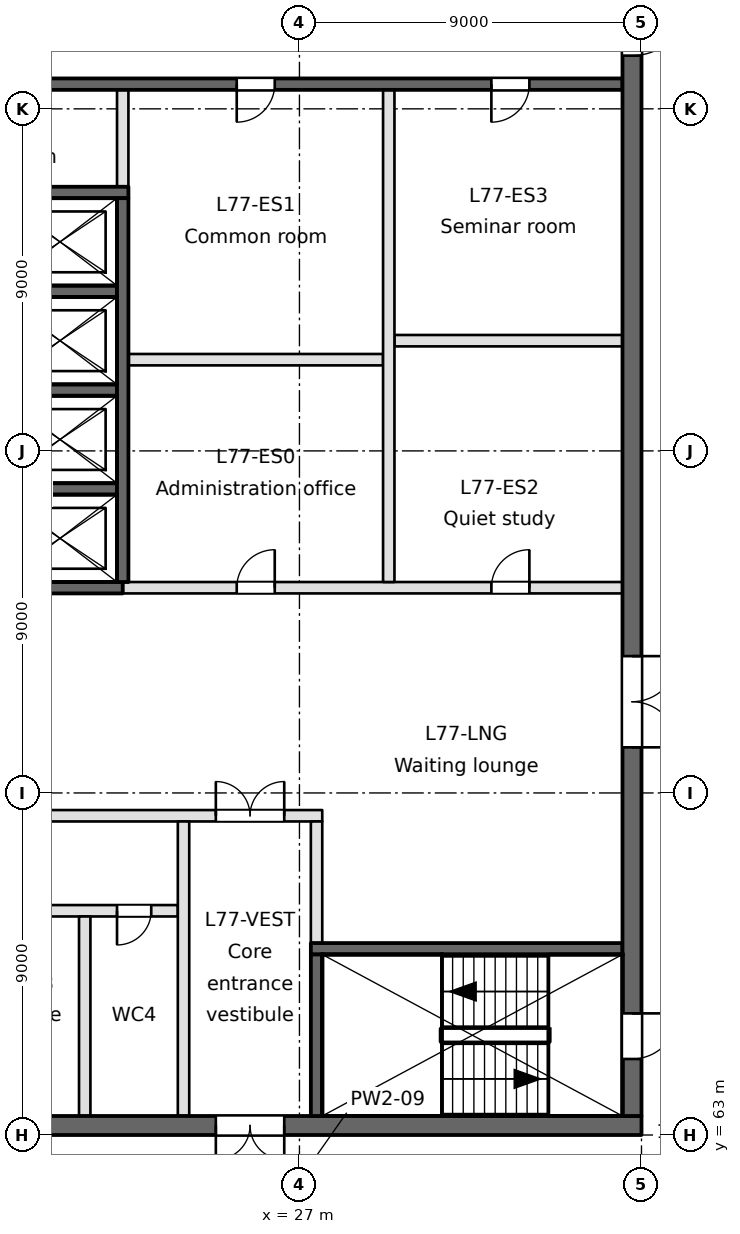
"""IFC4 building model, lengths in metres.
Left out: names, types, materials, properties, quantities, classifications, styles, units other than length and angle.
Written with IfcOpenShell. Run it as: python <this file> out.ifc"""

import sys

from ifc_helpers import new_model, si_unit, direction, frame, frame_2d, origin, place, context, subcontext, project, spatial, rectangle, extrude, element, fill, save


model = new_model("IFC4")
c1 = context("Model", 3, precision=1e-05, world=origin(), true_north=direction((0.0, 1.0)))
c2 = subcontext(c1, "Body", "Model", "MODEL_VIEW")
j1 = project(units=[si_unit("LENGTHUNIT", "METRE"), si_unit("PLANEANGLEUNIT", "RADIAN")], contexts=[c1])
p1 = place(None, origin())
s1 = spatial("IfcSite", under=j1, at=p1, CompositionType="ELEMENT")
p2 = place(p1, origin())
s2 = spatial("IfcBuilding", under=s1, at=p2, CompositionType="ELEMENT")
p3 = place(p2, frame((0.0, 0.0, 299.3)))
s3 = spatial("IfcBuildingStorey", under=s2, at=p3, CompositionType="ELEMENT", Elevation=299.3)
p4 = place(p3, frame((0.9, 63.25, -0.4), z_axis=(0.0, 0.0, 1.0), x_axis=(1.0, 0.0, 0.0)))
e1 = element("IfcWall", 1, at=p4, inside=s3, PredefinedType="SOLIDWALL", context=c2, shape_type="SweptSolid", body=[
    extrude(rectangle(XDim=35.1, YDim=0.5, at=frame_2d((17.55, 0.0))), origin(), (0.0, 0.0, 1.0), 3.65),
])
p5 = place(p4, frame((23.9, 0.0, 0.4)))
e2 = element("IfcOpeningElement", 2, at=p5, cuts=e1, PredefinedType="OPENING", context=c2, shape_type="SweptSolid", body=[
    extrude(rectangle(XDim=1.8, YDim=2.1, at=frame_2d((0.9, 1.05))), frame((0.0, 0.25, 0.0), z_axis=(0.0, -1.0, 0.0), x_axis=(1.0, 0.0, 0.0)), (0.0, 0.0, 1.0), 0.5),
])
p6 = place(p4, frame((1.55, 0.0, 0.4)))
e3 = element("IfcOpeningElement", 3, at=p6, cuts=e1, PredefinedType="OPENING", context=c2, shape_type="SweptSolid", body=[
    extrude(rectangle(XDim=1.2, YDim=2.1, at=frame_2d((0.6, 1.05))), frame((0.0, 0.25, 0.0), z_axis=(0.0, -1.0, 0.0), x_axis=(1.0, 0.0, 0.0)), (0.0, 0.0, 1.0), 0.5),
])
p7 = place(p4, frame((6.15, 0.0, 0.4)))
e4 = element("IfcOpeningElement", 4, at=p7, cuts=e1, PredefinedType="OPENING", context=c2, shape_type="SweptSolid", body=[
    extrude(rectangle(XDim=1.2, YDim=2.1, at=frame_2d((0.6, 1.05))), frame((0.0, 0.25, 0.0), z_axis=(0.0, -1.0, 0.0), x_axis=(1.0, 0.0, 0.0)), (0.0, 0.0, 1.0), 0.5),
])
p8 = place(p3, frame((27.3, 67.9, -0.4), z_axis=(0.0, 0.0, 1.0), x_axis=(1.0, 0.0, 0.0)))
e5 = element("IfcWall", 5, at=p8, inside=s3, PredefinedType="SOLIDWALL", context=c2, shape_type="SweptSolid", body=[
    extrude(rectangle(XDim=8.2, YDim=0.3, at=frame_2d((4.1, 0.0))), origin(), (0.0, 0.0, 1.0), 3.65),
])
p9 = place(p3, frame((10.1, 68.9, 0.0), z_axis=(0.0, 0.0, 1.0), x_axis=(1.0, 0.0, 0.0)))
e6 = element("IfcWall", 6, at=p9, inside=s3, PredefinedType="PARTITIONING", context=c2, shape_type="SweptSolid", body=[
    extrude(rectangle(XDim=13.7, YDim=0.3, at=frame_2d((6.85, 0.0))), origin(), (0.0, 0.0, 1.0), 3.25),
])
p10 = place(p9, frame((1.25, 0.0, 0.0)))
e7 = element("IfcOpeningElement", 7, at=p10, cuts=e6, PredefinedType="OPENING", context=c2, shape_type="SweptSolid", body=[
    extrude(rectangle(XDim=0.9, YDim=2.1, at=frame_2d((0.45, 1.05))), frame((0.0, 0.15, 0.0), z_axis=(0.0, -1.0, 0.0), x_axis=(1.0, 0.0, 0.0)), (0.0, 0.0, 1.0), 0.3),
])
p11 = place(p9, frame((5.0, 0.0, 0.0)))
e8 = element("IfcOpeningElement", 8, at=p11, cuts=e6, PredefinedType="OPENING", context=c2, shape_type="SweptSolid", body=[
    extrude(rectangle(XDim=0.9, YDim=2.1, at=frame_2d((0.45, 1.05))), frame((0.0, 0.15, 0.0), z_axis=(0.0, -1.0, 0.0), x_axis=(1.0, 0.0, 0.0)), (0.0, 0.0, 1.0), 0.3),
])
p12 = place(p9, frame((8.8, 0.0, 0.0)))
e9 = element("IfcOpeningElement", 9, at=p12, cuts=e6, PredefinedType="OPENING", context=c2, shape_type="SweptSolid", body=[
    extrude(rectangle(XDim=1.0, YDim=2.1, at=frame_2d((0.5, 1.05))), frame((0.0, 0.15, 0.0), z_axis=(0.0, -1.0, 0.0), x_axis=(1.0, 0.0, 0.0)), (0.0, 0.0, 1.0), 0.3),
])
p13 = place(p9, frame((12.1, 0.0, 0.0)))
e10 = element("IfcOpeningElement", 10, at=p13, cuts=e6, PredefinedType="OPENING", context=c2, shape_type="SweptSolid", body=[
    extrude(rectangle(XDim=0.9, YDim=2.1, at=frame_2d((0.45, 1.05))), frame((0.0, 0.15, 0.0), z_axis=(0.0, -1.0, 0.0), x_axis=(1.0, 0.0, 0.0)), (0.0, 0.0, 1.0), 0.3),
])
p14 = place(p3, frame((9.95, 71.4, 0.0), z_axis=(0.0, 0.0, 1.0), x_axis=(1.0, 0.0, 0.0)))
e11 = element("IfcWall", 11, at=p14, inside=s3, PredefinedType="PARTITIONING", context=c2, shape_type="SweptSolid", body=[
    extrude(rectangle(XDim=17.65, YDim=0.3, at=frame_2d((8.825, 0.0))), origin(), (0.0, 0.0, 1.0), 3.25),
])
p15 = place(p14, frame((14.85, 0.0, 0.0)))
e12 = element("IfcOpeningElement", 12, at=p15, cuts=e11, PredefinedType="OPENING", context=c2, shape_type="SweptSolid", body=[
    extrude(rectangle(XDim=1.8, YDim=2.1, at=frame_2d((0.9, 1.05))), frame((0.0, 0.15, 0.0), z_axis=(0.0, -1.0, 0.0), x_axis=(1.0, 0.0, 0.0)), (0.0, 0.0, 1.0), 0.3),
])
p16 = place(p14, frame((6.4, 0.0, 0.0)))
e13 = element("IfcOpeningElement", 13, at=p16, cuts=e11, PredefinedType="OPENING", context=c2, shape_type="SweptSolid", body=[
    extrude(rectangle(XDim=1.2, YDim=2.1, at=frame_2d((0.6, 1.05))), frame((0.0, 0.15, 0.0), z_axis=(0.0, -1.0, 0.0), x_axis=(1.0, 0.0, 0.0)), (0.0, 0.0, 1.0), 0.3),
])
p17 = place(p3, frame((0.9, 77.4, -0.4), z_axis=(0.0, 0.0, 1.0), x_axis=(1.0, 0.0, 0.0)))
e14 = element("IfcWall", 14, at=p17, inside=s3, PredefinedType="SOLIDWALL", context=c2, shape_type="SweptSolid", body=[
    extrude(rectangle(XDim=21.45, YDim=0.3, at=frame_2d((10.725, 0.0))), origin(), (0.0, 0.0, 1.0), 3.65),
])
p18 = place(p17, frame((15.15, 0.0, 0.4)))
e15 = element("IfcOpeningElement", 15, at=p18, cuts=e14, PredefinedType="OPENING", context=c2, shape_type="SweptSolid", body=[
    extrude(rectangle(XDim=1.8, YDim=2.1, at=frame_2d((0.9, 1.05))), frame((0.0, 0.15, 0.0), z_axis=(0.0, -1.0, 0.0), x_axis=(1.0, 0.0, 0.0)), (0.0, 0.0, 1.0), 0.3),
])
p19 = place(p17, frame((2.35, 0.0, 0.4)))
e16 = element("IfcOpeningElement", 16, at=p19, cuts=e14, PredefinedType="OPENING", context=c2, shape_type="SweptSolid", body=[
    extrude(rectangle(XDim=1.0, YDim=2.1, at=frame_2d((0.5, 1.05))), frame((0.0, 0.15, 0.0), z_axis=(0.0, -1.0, 0.0), x_axis=(1.0, 0.0, 0.0)), (0.0, 0.0, 1.0), 0.3),
])
p20 = place(p17, frame((7.75, 0.0, 0.4)))
e17 = element("IfcOpeningElement", 17, at=p20, cuts=e14, PredefinedType="OPENING", context=c2, shape_type="SweptSolid", body=[
    extrude(rectangle(XDim=1.0, YDim=2.1, at=frame_2d((0.5, 1.05))), frame((0.0, 0.15, 0.0), z_axis=(0.0, -1.0, 0.0), x_axis=(1.0, 0.0, 0.0)), (0.0, 0.0, 1.0), 0.3),
])
p21 = place(p3, frame((22.35, 77.4, 0.0), z_axis=(0.0, 0.0, 1.0), x_axis=(1.0, 0.0, 0.0)))
e18 = element("IfcWall", 18, at=p21, inside=s3, PredefinedType="PARTITIONING", context=c2, shape_type="SweptSolid", body=[
    extrude(rectangle(XDim=13.15, YDim=0.3, at=frame_2d((6.575, 0.0))), origin(), (0.0, 0.0, 1.0), 3.25),
])
p22 = place(p21, frame((3.0, 0.0, 0.0)))
e19 = element("IfcOpeningElement", 19, at=p22, cuts=e18, PredefinedType="OPENING", context=c2, shape_type="SweptSolid", body=[
    extrude(rectangle(XDim=1.0, YDim=2.1, at=frame_2d((0.5, 1.05))), frame((0.0, 0.15, 0.0), z_axis=(0.0, -1.0, 0.0), x_axis=(1.0, 0.0, 0.0)), (0.0, 0.0, 1.0), 0.3),
])
p23 = place(p21, frame((9.7, 0.0, 0.0)))
e20 = element("IfcOpeningElement", 20, at=p23, cuts=e18, PredefinedType="OPENING", context=c2, shape_type="SweptSolid", body=[
    extrude(rectangle(XDim=1.0, YDim=2.1, at=frame_2d((0.5, 1.05))), frame((0.0, 0.15, 0.0), z_axis=(0.0, -1.0, 0.0), x_axis=(1.0, 0.0, 0.0)), (0.0, 0.0, 1.0), 0.3),
])
for number, where, z_axis, x_axis in (
    (21, (19.2, 80.0, -0.4), (0.0, 0.0, 1.0), (1.0, 0.0, 0.0)),
    (22, (19.2, 82.6, -0.4), (0.0, 0.0, 1.0), (1.0, 0.0, 0.0)),
):
    element("IfcWall", number, at=place(p3, frame(where, z_axis=z_axis, x_axis=x_axis)), inside=s3, PredefinedType="SOLIDWALL", context=c2, shape_type="SweptSolid", body=[
        extrude(rectangle(XDim=3.0, YDim=0.3, at=frame_2d((1.5, 0.0))), origin(), (0.0, 0.0, 1.0), 3.65),
    ])
p24 = place(p3, frame((22.5, 83.4, 0.0), z_axis=(0.0, 0.0, 1.0), x_axis=(1.0, 0.0, 0.0)))
e23 = element("IfcWall", 23, at=p24, inside=s3, PredefinedType="PARTITIONING", context=c2, shape_type="SweptSolid", body=[
    extrude(rectangle(XDim=6.7, YDim=0.3, at=frame_2d((3.35, 0.0))), origin(), (0.0, 0.0, 1.0), 3.25),
])
p25 = place(p3, frame((29.5, 83.9, 0.0), z_axis=(0.0, 0.0, 1.0), x_axis=(1.0, 0.0, 0.0)))
e24 = element("IfcWall", 24, at=p25, inside=s3, PredefinedType="PARTITIONING", context=c2, shape_type="SweptSolid", body=[
    extrude(rectangle(XDim=6.0, YDim=0.3, at=frame_2d((3.0, 0.0))), origin(), (0.0, 0.0, 1.0), 3.25),
])
p26 = place(p3, frame((19.2, 85.2, -0.4), z_axis=(0.0, 0.0, 1.0), x_axis=(1.0, 0.0, 0.0)))
e25 = element("IfcWall", 25, at=p26, inside=s3, PredefinedType="SOLIDWALL", context=c2, shape_type="SweptSolid", body=[
    extrude(rectangle(XDim=3.0, YDim=0.3, at=frame_2d((1.5, 0.0))), origin(), (0.0, 0.0, 1.0), 3.65),
])
p27 = place(p3, frame((11.4, 87.8, -0.4), z_axis=(0.0, 0.0, 1.0), x_axis=(1.0, 0.0, 0.0)))
e26 = element("IfcWall", 26, at=p27, inside=s3, PredefinedType="SOLIDWALL", context=c2, shape_type="SweptSolid", body=[
    extrude(rectangle(XDim=11.1, YDim=0.3, at=frame_2d((5.55, 0.0))), origin(), (0.0, 0.0, 1.0), 3.65),
])
p28 = place(p3, frame((0.9, 90.65, -0.4), z_axis=(0.0, 0.0, 1.0), x_axis=(1.0, 0.0, 0.0)))
e27 = element("IfcWall", 27, at=p28, inside=s3, PredefinedType="SOLIDWALL", context=c2, shape_type="SweptSolid", body=[
    extrude(rectangle(XDim=34.6, YDim=0.3, at=frame_2d((17.3, 0.0))), origin(), (0.0, 0.0, 1.0), 3.65),
])
p29 = place(p28, frame((15.55, 0.0, 0.4)))
e28 = element("IfcOpeningElement", 28, at=p29, cuts=e27, PredefinedType="OPENING", context=c2, shape_type="SweptSolid", body=[
    extrude(rectangle(XDim=1.0, YDim=2.1, at=frame_2d((0.5, 1.05))), frame((0.0, 0.15, 0.0), z_axis=(0.0, -1.0, 0.0), x_axis=(1.0, 0.0, 0.0)), (0.0, 0.0, 1.0), 0.3),
])
p30 = place(p28, frame((2.35, 0.0, 0.4)))
e29 = element("IfcOpeningElement", 29, at=p30, cuts=e27, PredefinedType="OPENING", context=c2, shape_type="SweptSolid", body=[
    extrude(rectangle(XDim=1.0, YDim=2.1, at=frame_2d((0.5, 1.05))), frame((0.0, 0.15, 0.0), z_axis=(0.0, -1.0, 0.0), x_axis=(1.0, 0.0, 0.0)), (0.0, 0.0, 1.0), 0.3),
])
p31 = place(p28, frame((7.75, 0.0, 0.4)))
e30 = element("IfcOpeningElement", 30, at=p31, cuts=e27, PredefinedType="OPENING", context=c2, shape_type="SweptSolid", body=[
    extrude(rectangle(XDim=1.0, YDim=2.1, at=frame_2d((0.5, 1.05))), frame((0.0, 0.15, 0.0), z_axis=(0.0, -1.0, 0.0), x_axis=(1.0, 0.0, 0.0)), (0.0, 0.0, 1.0), 0.3),
])
p32 = place(p28, frame((24.45, 0.0, 0.4)))
e31 = element("IfcOpeningElement", 31, at=p32, cuts=e27, PredefinedType="OPENING", context=c2, shape_type="SweptSolid", body=[
    extrude(rectangle(XDim=1.0, YDim=2.1, at=frame_2d((0.5, 1.05))), frame((0.0, 0.15, 0.0), z_axis=(0.0, -1.0, 0.0), x_axis=(1.0, 0.0, 0.0)), (0.0, 0.0, 1.0), 0.3),
])
p33 = place(p28, frame((31.15, 0.0, 0.4)))
e32 = element("IfcOpeningElement", 32, at=p33, cuts=e27, PredefinedType="OPENING", context=c2, shape_type="SweptSolid", body=[
    extrude(rectangle(XDim=1.0, YDim=2.1, at=frame_2d((0.5, 1.05))), frame((0.0, 0.15, 0.0), z_axis=(0.0, -1.0, 0.0), x_axis=(1.0, 0.0, 0.0)), (0.0, 0.0, 1.0), 0.3),
])
p34 = place(p3, frame((21.35, 63.5, 0.0), z_axis=(0.0, 0.0, 1.0), x_axis=(0.0, 1.0, 0.0)))
e33 = element("IfcWall", 33, at=p34, inside=s3, PredefinedType="PARTITIONING", context=c2, shape_type="SweptSolid", body=[
    extrude(rectangle(XDim=5.25, YDim=0.3, at=frame_2d((2.625, 0.0))), origin(), (0.0, 0.0, 1.0), 3.25),
])
p35 = place(p3, frame((22.35, 77.55, -0.4), z_axis=(0.0, 0.0, 1.0), x_axis=(0.0, 1.0, 0.0)))
e34 = element("IfcWall", 34, at=p35, inside=s3, PredefinedType="SOLIDWALL", context=c2, shape_type="SweptSolid", body=[
    extrude(rectangle(XDim=10.1, YDim=0.3, at=frame_2d((5.05, 0.0))), origin(), (0.0, 0.0, 1.0), 3.65),
])
p36 = place(p3, frame((22.35, 87.95, 0.0), z_axis=(0.0, 0.0, 1.0), x_axis=(0.0, 1.0, 0.0)))
e35 = element("IfcWall", 35, at=p36, inside=s3, PredefinedType="PARTITIONING", context=c2, shape_type="SweptSolid", body=[
    extrude(rectangle(XDim=2.55, YDim=0.3, at=frame_2d((1.275, 0.0))), origin(), (0.0, 0.0, 1.0), 3.25),
])
p37 = place(p3, frame((23.95, 63.5, 0.0), z_axis=(0.0, 0.0, 1.0), x_axis=(0.0, 1.0, 0.0)))
e36 = element("IfcWall", 36, at=p37, inside=s3, PredefinedType="PARTITIONING", context=c2, shape_type="SweptSolid", body=[
    extrude(rectangle(XDim=7.75, YDim=0.3, at=frame_2d((3.875, 0.0))), origin(), (0.0, 0.0, 1.0), 3.25),
])
p38 = place(p3, frame((27.45, 63.5, -0.4), z_axis=(0.0, 0.0, 1.0), x_axis=(0.0, 1.0, 0.0)))
e37 = element("IfcWall", 37, at=p38, inside=s3, PredefinedType="SOLIDWALL", context=c2, shape_type="SweptSolid", body=[
    extrude(rectangle(XDim=4.25, YDim=0.3, at=frame_2d((2.125, 0.0))), origin(), (0.0, 0.0, 1.0), 3.65),
])
p39 = place(p3, frame((27.45, 68.05, 0.0), z_axis=(0.0, 0.0, 1.0), x_axis=(0.0, 1.0, 0.0)))
e38 = element("IfcWall", 38, at=p39, inside=s3, PredefinedType="PARTITIONING", context=c2, shape_type="SweptSolid", body=[
    extrude(rectangle(XDim=3.2, YDim=0.3, at=frame_2d((1.6, 0.0))), origin(), (0.0, 0.0, 1.0), 3.25),
])
p40 = place(p3, frame((29.35, 77.55, 0.0), z_axis=(0.0, 0.0, 1.0), x_axis=(0.0, 1.0, 0.0)))
e39 = element("IfcWall", 39, at=p40, inside=s3, PredefinedType="PARTITIONING", context=c2, shape_type="SweptSolid", body=[
    extrude(rectangle(XDim=12.95, YDim=0.3, at=frame_2d((6.475, 0.0))), origin(), (0.0, 0.0, 1.0), 3.25),
])
p41 = place(p3, frame((35.75, 63.5, -0.4), z_axis=(0.0, 0.0, 1.0), x_axis=(0.0, 1.0, 0.0)))
e40 = element("IfcWall", 40, at=p41, inside=s3, PredefinedType="SOLIDWALL", context=c2, shape_type="SweptSolid", body=[
    extrude(rectangle(XDim=34.6, YDim=0.5, at=frame_2d((17.3, 0.0))), origin(), (0.0, 0.0, 1.0), 3.65),
])
p42 = place(p41, frame((9.7, 0.0, 0.4)))
e41 = element("IfcOpeningElement", 41, at=p42, cuts=e40, PredefinedType="OPENING", context=c2, shape_type="SweptSolid", body=[
    extrude(rectangle(XDim=2.4, YDim=2.1, at=frame_2d((1.2, 1.05))), frame((0.0, 0.25, 0.0), z_axis=(0.0, -1.0, 0.0), x_axis=(1.0, 0.0, 0.0)), (0.0, 0.0, 1.0), 0.5),
])
p43 = place(p41, frame((27.9, 0.0, 0.4)))
e42 = element("IfcOpeningElement", 42, at=p43, cuts=e40, PredefinedType="OPENING", context=c2, shape_type="SweptSolid", body=[
    extrude(rectangle(XDim=1.5, YDim=2.1, at=frame_2d((0.75, 1.05))), frame((0.0, 0.25, 0.0), z_axis=(0.0, -1.0, 0.0), x_axis=(1.0, 0.0, 0.0)), (0.0, 0.0, 1.0), 0.5),
])
p44 = place(p41, frame((1.5, 0.0, 0.4)))
e43 = element("IfcOpeningElement", 43, at=p44, cuts=e40, PredefinedType="OPENING", context=c2, shape_type="SweptSolid", body=[
    extrude(rectangle(XDim=1.2, YDim=2.1, at=frame_2d((0.6, 1.05))), frame((0.0, 0.25, 0.0), z_axis=(0.0, -1.0, 0.0), x_axis=(1.0, 0.0, 0.0)), (0.0, 0.0, 1.0), 0.5),
])
p45 = place(p42, frame((2.4, 0.0, 0.0), z_axis=(0.0, 0.0, 1.0), x_axis=(-1.0, 0.0, 0.0)))
e44 = element("IfcDoor", 44, at=p45, inside=s3, OperationType="DOUBLE_DOOR_SINGLE_SWING", PredefinedType="DOOR", context=c2, shape_type="SweptSolid", body=[
    extrude(rectangle(XDim=2.4, YDim=2.1, at=frame_2d((1.2, 1.05))), frame((0.0, 0.025, 0.0), z_axis=(0.0, -1.0, 0.0), x_axis=(1.0, 0.0, 0.0)), (0.0, 0.0, 1.0), 0.05),
])
fill(e41, e44)
p46 = place(p43, frame((1.5, 0.0, 0.0), z_axis=(0.0, 0.0, 1.0), x_axis=(-1.0, 0.0, 0.0)))
e45 = element("IfcDoor", 45, at=p46, inside=s3, OperationType="SINGLE_SWING_LEFT", PredefinedType="DOOR", context=c2, shape_type="SweptSolid", body=[
    extrude(rectangle(XDim=1.5, YDim=2.1, at=frame_2d((0.75, 1.05))), frame((0.0, 0.025, 0.0), z_axis=(0.0, -1.0, 0.0), x_axis=(1.0, 0.0, 0.0)), (0.0, 0.0, 1.0), 0.05),
])
fill(e42, e45)
p47 = place(p5, frame((1.8, 0.0, 0.0), z_axis=(0.0, 0.0, 1.0), x_axis=(-1.0, 0.0, 0.0)))
e46 = element("IfcDoor", 46, at=p47, inside=s3, OperationType="DOUBLE_DOOR_SINGLE_SWING", PredefinedType="DOOR", context=c2, shape_type="SweptSolid", body=[
    extrude(rectangle(XDim=1.8, YDim=2.1, at=frame_2d((0.9, 1.05))), frame((0.0, 0.025, 0.0), z_axis=(0.0, -1.0, 0.0), x_axis=(1.0, 0.0, 0.0)), (0.0, 0.0, 1.0), 0.05),
])
fill(e2, e46)
p48 = place(p15, origin())
e47 = element("IfcDoor", 47, at=p48, inside=s3, OperationType="DOUBLE_DOOR_SINGLE_SWING", PredefinedType="DOOR", context=c2, shape_type="SweptSolid", body=[
    extrude(rectangle(XDim=1.8, YDim=2.1, at=frame_2d((0.9, 1.05))), frame((0.0, 0.025, 0.0), z_axis=(0.0, -1.0, 0.0), x_axis=(1.0, 0.0, 0.0)), (0.0, 0.0, 1.0), 0.05),
])
fill(e12, e47)
p49 = place(p13, frame((0.9, 0.0, 0.0), z_axis=(0.0, 0.0, 1.0), x_axis=(-1.0, 0.0, 0.0)))
e48 = element("IfcDoor", 48, at=p49, inside=s3, OperationType="SINGLE_SWING_RIGHT", PredefinedType="DOOR", context=c2, shape_type="SweptSolid", body=[
    extrude(rectangle(XDim=0.9, YDim=2.1, at=frame_2d((0.45, 1.05))), frame((0.0, 0.025, 0.0), z_axis=(0.0, -1.0, 0.0), x_axis=(1.0, 0.0, 0.0)), (0.0, 0.0, 1.0), 0.05),
])
fill(e10, e48)
p50 = place(p44, frame((1.2, 0.0, 0.0), z_axis=(0.0, 0.0, 1.0), x_axis=(-1.0, 0.0, 0.0)))
e49 = element("IfcDoor", 49, at=p50, inside=s3, OperationType="SINGLE_SWING_LEFT", PredefinedType="DOOR", context=c2, shape_type="SweptSolid", body=[
    extrude(rectangle(XDim=1.2, YDim=2.1, at=frame_2d((0.6, 1.05))), frame((0.0, 0.025, 0.0), z_axis=(0.0, -1.0, 0.0), x_axis=(1.0, 0.0, 0.0)), (0.0, 0.0, 1.0), 0.05),
])
fill(e43, e49)
p51 = place(p22, origin())
e50 = element("IfcDoor", 50, at=p51, inside=s3, OperationType="SINGLE_SWING_RIGHT", PredefinedType="DOOR", context=c2, shape_type="SweptSolid", body=[
    extrude(rectangle(XDim=1.0, YDim=2.1, at=frame_2d((0.5, 1.05))), frame((0.0, 0.025, 0.0), z_axis=(0.0, -1.0, 0.0), x_axis=(1.0, 0.0, 0.0)), (0.0, 0.0, 1.0), 0.05),
])
fill(e19, e50)
p52 = place(p32, frame((1.0, 0.0, 0.0), z_axis=(0.0, 0.0, 1.0), x_axis=(-1.0, 0.0, 0.0)))
e51 = element("IfcDoor", 51, at=p52, inside=s3, OperationType="SINGLE_SWING_RIGHT", PredefinedType="DOOR", context=c2, shape_type="SweptSolid", body=[
    extrude(rectangle(XDim=1.0, YDim=2.1, at=frame_2d((0.5, 1.05))), frame((0.0, 0.025, 0.0), z_axis=(0.0, -1.0, 0.0), x_axis=(1.0, 0.0, 0.0)), (0.0, 0.0, 1.0), 0.05),
])
fill(e31, e51)
p53 = place(p23, origin())
e52 = element("IfcDoor", 52, at=p53, inside=s3, OperationType="SINGLE_SWING_RIGHT", PredefinedType="DOOR", context=c2, shape_type="SweptSolid", body=[
    extrude(rectangle(XDim=1.0, YDim=2.1, at=frame_2d((0.5, 1.05))), frame((0.0, 0.025, 0.0), z_axis=(0.0, -1.0, 0.0), x_axis=(1.0, 0.0, 0.0)), (0.0, 0.0, 1.0), 0.05),
])
fill(e20, e52)
p54 = place(p33, frame((1.0, 0.0, 0.0), z_axis=(0.0, 0.0, 1.0), x_axis=(-1.0, 0.0, 0.0)))
e53 = element("IfcDoor", 53, at=p54, inside=s3, OperationType="SINGLE_SWING_RIGHT", PredefinedType="DOOR", context=c2, shape_type="SweptSolid", body=[
    extrude(rectangle(XDim=1.0, YDim=2.1, at=frame_2d((0.5, 1.05))), frame((0.0, 0.025, 0.0), z_axis=(0.0, -1.0, 0.0), x_axis=(1.0, 0.0, 0.0)), (0.0, 0.0, 1.0), 0.05),
])
fill(e32, e53)
save(model, sys.argv[1])
